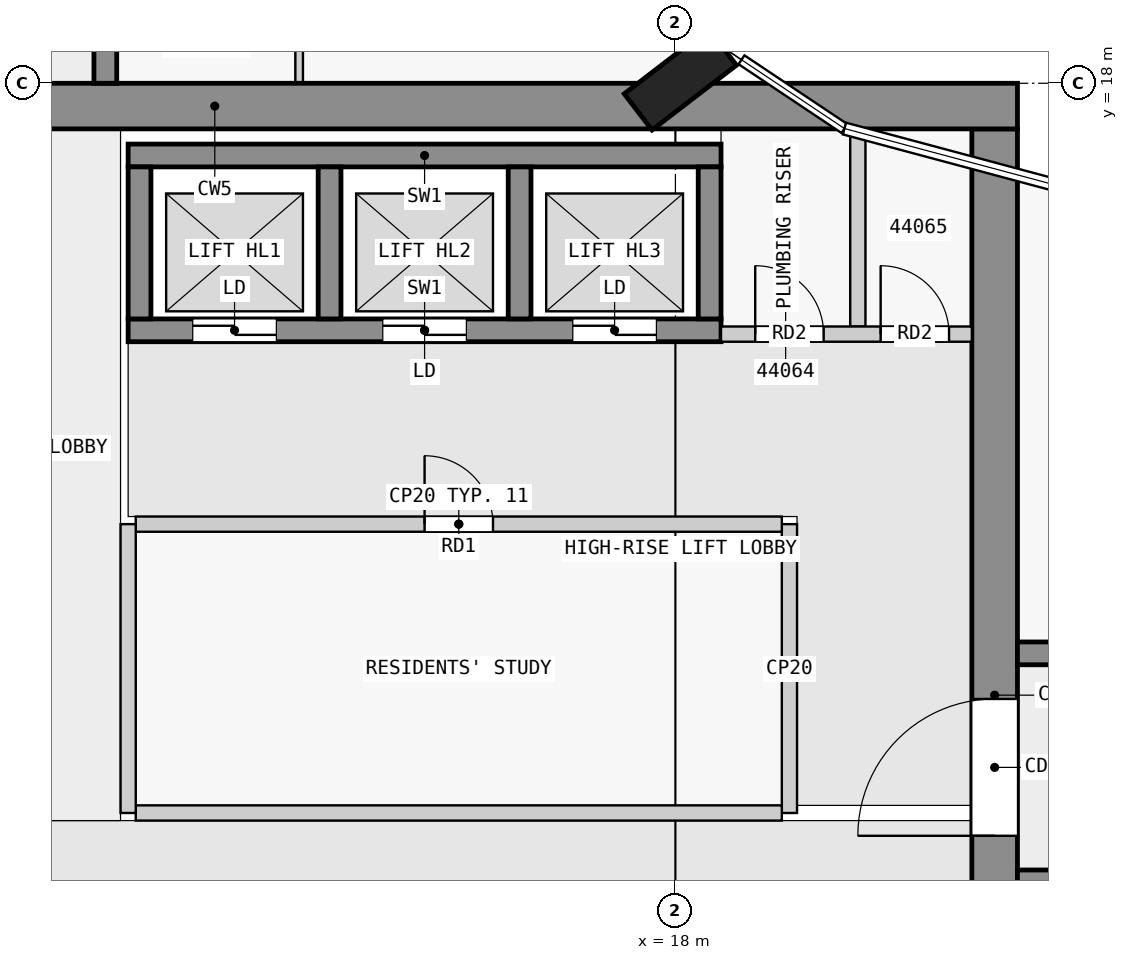
"""IFC4 building model, lengths in metres.
Left out: names, types, materials, properties, quantities, classifications, styles, units other than length and angle.
Written with IfcOpenShell. Run it as: python <this file> out.ifc"""

import sys

from ifc_helpers import new_model, si_unit, direction, frame, frame_2d, origin, origin_2d, place, context, subcontext, project, spatial, rectangle, extrude, element, fill, save


model = new_model("IFC4")
c1 = context("Model", 3, precision=1e-05, world=origin(), true_north=direction((0.0, 1.0)))
c2 = subcontext(c1, "Body", "Model", "MODEL_VIEW")
j1 = project(units=[si_unit("LENGTHUNIT", "METRE"), si_unit("PLANEANGLEUNIT", "RADIAN")], contexts=[c1])
p1 = place(None, origin())
s1 = spatial("IfcSite", under=j1, at=p1, CompositionType="ELEMENT")
p2 = place(p1, origin())
s2 = spatial("IfcBuilding", under=s1, at=p2, CompositionType="ELEMENT")
p3 = place(p2, frame((0.0, 0.0, 170.9)))
s3 = spatial("IfcBuildingStorey", under=s2, at=p3, CompositionType="ELEMENT", Elevation=170.9)
p4 = place(p3, frame((18.065, 18.05, 0.0), z_axis=(0.0, 0.0, 1.0), x_axis=(-0.608810846443, 0.793315418515, 0.0)))
e1 = element("IfcColumn", 1, at=p4, inside=s3, PredefinedType="COLUMN", context=c2, shape_type="SweptSolid", body=[
    extrude(rectangle(XDim=0.6, YDim=1.4, at=origin_2d()), origin(), (0.0, 0.0, 1.0), 3.5),
])
p5 = place(p3, frame((1.38, 17.7, 0.0), z_axis=(0.0, 0.0, 1.0), x_axis=(1.0, 0.0, 0.0)))
e2 = element("IfcWall", 2, at=p5, inside=s3, PredefinedType="SHEAR", context=c2, shape_type="SweptSolid", body=[
    extrude(rectangle(XDim=21.12, YDim=0.6, at=frame_2d((10.56, 0.0))), origin(), (0.0, 0.0, 1.0), 3.25),
])
p6 = place(p5, frame((6.4, 0.0, 0.0)))
e3 = element("IfcOpeningElement", 3, at=p6, cuts=e2, PredefinedType="OPENING", context=c2, shape_type="SweptSolid", body=[
    extrude(rectangle(XDim=1.8, YDim=2.1, at=frame_2d((0.9, 1.05))), frame((0.0, 0.31, 0.0), z_axis=(0.0, -1.0, 0.0), x_axis=(1.0, 0.0, 0.0)), (0.0, 0.0, 1.0), 0.62),
])
p7 = place(p3, frame((22.2, 2.5, 0.0), z_axis=(0.0, 0.0, 1.0), x_axis=(0.0, 1.0, 0.0)))
e4 = element("IfcWall", 4, at=p7, inside=s3, PredefinedType="SHEAR", context=c2, shape_type="SweptSolid", body=[
    extrude(rectangle(XDim=14.9, YDim=0.6, at=frame_2d((7.45, 0.0))), origin(), (0.0, 0.0, 1.0), 3.25),
])
p8 = place(p7, frame((5.6, 0.0, 0.0)))
e5 = element("IfcOpeningElement", 5, at=p8, cuts=e4, PredefinedType="OPENING", context=c2, shape_type="SweptSolid", body=[
    extrude(rectangle(XDim=1.8, YDim=2.1, at=frame_2d((0.9, 1.05))), frame((0.0, 0.31, 0.0), z_axis=(0.0, -1.0, 0.0), x_axis=(1.0, 0.0, 0.0)), (0.0, 0.0, 1.0), 0.62),
])
p9 = place(p3, frame((10.8, 17.05, 0.0), z_axis=(0.0, 0.0, 1.0), x_axis=(1.0, 0.0, 0.0)))
e6 = element("IfcWall", 6, at=p9, inside=s3, PredefinedType="SHEAR", context=c2, shape_type="SweptSolid", body=[
    extrude(rectangle(XDim=7.8, YDim=0.3, at=frame_2d((3.9, 0.0))), origin(), (0.0, 0.0, 1.0), 3.25),
])
p10 = place(p3, frame((10.8, 14.75, 0.0), z_axis=(0.0, 0.0, 1.0), x_axis=(1.0, 0.0, 0.0)))
e7 = element("IfcWall", 7, at=p10, inside=s3, PredefinedType="SHEAR", context=c2, shape_type="SweptSolid", body=[
    extrude(rectangle(XDim=7.8, YDim=0.3, at=frame_2d((3.9, 0.0))), origin(), (0.0, 0.0, 1.0), 3.25),
])
p11 = place(p10, frame((0.85, 0.0, 0.0)))
e8 = element("IfcOpeningElement", 8, at=p11, cuts=e7, PredefinedType="OPENING", context=c2, shape_type="SweptSolid", body=[
    extrude(rectangle(XDim=1.1, YDim=2.1, at=frame_2d((0.55, 1.05))), frame((0.0, 0.16, 0.0), z_axis=(0.0, -1.0, 0.0), x_axis=(1.0, 0.0, 0.0)), (0.0, 0.0, 1.0), 0.32),
])
p12 = place(p10, frame((3.35, 0.0, 0.0)))
e9 = element("IfcOpeningElement", 9, at=p12, cuts=e7, PredefinedType="OPENING", context=c2, shape_type="SweptSolid", body=[
    extrude(rectangle(XDim=1.1, YDim=2.1, at=frame_2d((0.55, 1.05))), frame((0.0, 0.16, 0.0), z_axis=(0.0, -1.0, 0.0), x_axis=(1.0, 0.0, 0.0)), (0.0, 0.0, 1.0), 0.32),
])
p13 = place(p10, frame((5.85, 0.0, 0.0)))
e10 = element("IfcOpeningElement", 10, at=p13, cuts=e7, PredefinedType="OPENING", context=c2, shape_type="SweptSolid", body=[
    extrude(rectangle(XDim=1.1, YDim=2.1, at=frame_2d((0.55, 1.05))), frame((0.0, 0.16, 0.0), z_axis=(0.0, -1.0, 0.0), x_axis=(1.0, 0.0, 0.0)), (0.0, 0.0, 1.0), 0.32),
])
for number, where, z_axis, x_axis in (
    (11, (10.95, 14.9, 0.0), (0.0, 0.0, 1.0), (0.0, 1.0, 0.0)),
    (12, (13.45, 14.9, 0.0), (0.0, 0.0, 1.0), (0.0, 1.0, 0.0)),
    (13, (15.95, 14.9, 0.0), (0.0, 0.0, 1.0), (0.0, 1.0, 0.0)),
    (14, (18.45, 14.9, 0.0), (0.0, 0.0, 1.0), (0.0, 1.0, 0.0)),
):
    element("IfcWall", number, at=place(p3, frame(where, z_axis=z_axis, x_axis=x_axis)), inside=s3, PredefinedType="SHEAR", context=c2, shape_type="SweptSolid", body=[
        extrude(rectangle(XDim=2.0, YDim=0.3, at=frame_2d((1.0, 0.0))), origin(), (0.0, 0.0, 1.0), 3.25),
    ])
p14 = place(p3, frame((22.5, 7.5, 0.0), z_axis=(0.0, 0.0, 1.0), x_axis=(1.0, 0.0, 0.0)))
e15 = element("IfcWall", 15, at=p14, inside=s3, PredefinedType="SHEAR", context=c2, shape_type="SweptSolid", body=[
    extrude(rectangle(XDim=22.5, YDim=0.3, at=frame_2d((11.25, 0.0))), origin(), (0.0, 0.0, 1.0), 3.25),
])
p15 = place(p14, frame((4.05, 0.0, 0.0)))
e16 = element("IfcOpeningElement", 16, at=p15, cuts=e15, PredefinedType="OPENING", context=c2, shape_type="SweptSolid", body=[
    extrude(rectangle(XDim=1.0, YDim=2.1, at=frame_2d((0.5, 1.05))), frame((0.0, 0.16, 0.0), z_axis=(0.0, -1.0, 0.0), x_axis=(1.0, 0.0, 0.0)), (0.0, 0.0, 1.0), 0.32),
])
p16 = place(p14, frame((10.75, 0.0, 0.0)))
e17 = element("IfcOpeningElement", 17, at=p16, cuts=e15, PredefinedType="OPENING", context=c2, shape_type="SweptSolid", body=[
    extrude(rectangle(XDim=1.0, YDim=2.1, at=frame_2d((0.5, 1.05))), frame((0.0, 0.16, 0.0), z_axis=(0.0, -1.0, 0.0), x_axis=(1.0, 0.0, 0.0)), (0.0, 0.0, 1.0), 0.32),
])
p17 = place(p14, frame((15.35, 0.0, 0.0)))
e18 = element("IfcOpeningElement", 18, at=p17, cuts=e15, PredefinedType="OPENING", context=c2, shape_type="SweptSolid", body=[
    extrude(rectangle(XDim=0.9, YDim=2.1, at=frame_2d((0.45, 1.05))), frame((0.0, 0.16, 0.0), z_axis=(0.0, -1.0, 0.0), x_axis=(1.0, 0.0, 0.0)), (0.0, 0.0, 1.0), 0.32),
])
p18 = place(p14, frame((18.75, 0.0, 0.0)))
e19 = element("IfcOpeningElement", 19, at=p18, cuts=e15, PredefinedType="OPENING", context=c2, shape_type="SweptSolid", body=[
    extrude(rectangle(XDim=0.9, YDim=2.1, at=frame_2d((0.45, 1.05))), frame((0.0, 0.16, 0.0), z_axis=(0.0, -1.0, 0.0), x_axis=(1.0, 0.0, 0.0)), (0.0, 0.0, 1.0), 0.32),
])
p19 = place(p14, frame((20.95, 0.0, 0.0)))
e20 = element("IfcOpeningElement", 20, at=p19, cuts=e15, PredefinedType="OPENING", context=c2, shape_type="SweptSolid", body=[
    extrude(rectangle(XDim=1.0, YDim=2.1, at=frame_2d((0.5, 1.05))), frame((0.0, 0.16, 0.0), z_axis=(0.0, -1.0, 0.0), x_axis=(1.0, 0.0, 0.0)), (0.0, 0.0, 1.0), 0.32),
])
p20 = place(p3, frame((22.5, 10.5, 0.0), z_axis=(0.0, 0.0, 1.0), x_axis=(1.0, 0.0, 0.0)))
e21 = element("IfcWall", 21, at=p20, inside=s3, PredefinedType="SHEAR", context=c2, shape_type="SweptSolid", body=[
    extrude(rectangle(XDim=22.5, YDim=0.3, at=frame_2d((11.25, 0.0))), origin(), (0.0, 0.0, 1.0), 3.25),
])
p21 = place(p20, frame((1.85, 0.0, 0.0)))
e22 = element("IfcOpeningElement", 22, at=p21, cuts=e21, PredefinedType="OPENING", context=c2, shape_type="SweptSolid", body=[
    extrude(rectangle(XDim=0.9, YDim=2.1, at=frame_2d((0.45, 1.05))), frame((0.0, 0.16, 0.0), z_axis=(0.0, -1.0, 0.0), x_axis=(1.0, 0.0, 0.0)), (0.0, 0.0, 1.0), 0.32),
])
p22 = place(p20, frame((6.25, 0.0, 0.0)))
e23 = element("IfcOpeningElement", 23, at=p22, cuts=e21, PredefinedType="OPENING", context=c2, shape_type="SweptSolid", body=[
    extrude(rectangle(XDim=1.0, YDim=2.1, at=frame_2d((0.5, 1.05))), frame((0.0, 0.16, 0.0), z_axis=(0.0, -1.0, 0.0), x_axis=(1.0, 0.0, 0.0)), (0.0, 0.0, 1.0), 0.32),
])
p23 = place(p20, frame((10.35, 0.0, 0.0)))
e24 = element("IfcOpeningElement", 24, at=p23, cuts=e21, PredefinedType="OPENING", context=c2, shape_type="SweptSolid", body=[
    extrude(rectangle(XDim=1.8, YDim=2.1, at=frame_2d((0.9, 1.05))), frame((0.0, 0.16, 0.0), z_axis=(0.0, -1.0, 0.0), x_axis=(1.0, 0.0, 0.0)), (0.0, 0.0, 1.0), 0.32),
])
p24 = place(p20, frame((16.85, 0.0, 0.0)))
e25 = element("IfcOpeningElement", 25, at=p24, cuts=e21, PredefinedType="OPENING", context=c2, shape_type="SweptSolid", body=[
    extrude(rectangle(XDim=1.0, YDim=2.1, at=frame_2d((0.5, 1.05))), frame((0.0, 0.16, 0.0), z_axis=(0.0, -1.0, 0.0), x_axis=(1.0, 0.0, 0.0)), (0.0, 0.0, 1.0), 0.32),
])
p25 = place(p3, frame((10.5, 18.0, 0.0), z_axis=(0.0, 0.0, 1.0), x_axis=(0.0, 1.0, 0.0)))
e26 = element("IfcWall", 26, at=p25, inside=s3, PredefinedType="SHEAR", context=c2, shape_type="SweptSolid", body=[
    extrude(rectangle(XDim=27.0, YDim=0.3, at=frame_2d((13.5, 0.0))), origin(), (0.0, 0.0, 1.0), 3.25),
])
p26 = place(p25, frame((1.75, 0.0, 0.0)))
e27 = element("IfcOpeningElement", 27, at=p26, cuts=e26, PredefinedType="OPENING", context=c2, shape_type="SweptSolid", body=[
    extrude(rectangle(XDim=1.0, YDim=2.1, at=frame_2d((0.5, 1.05))), frame((0.0, 0.16, 0.0), z_axis=(0.0, -1.0, 0.0), x_axis=(1.0, 0.0, 0.0)), (0.0, 0.0, 1.0), 0.32),
])
p27 = place(p25, frame((6.25, 0.0, 0.0)))
e28 = element("IfcOpeningElement", 28, at=p27, cuts=e26, PredefinedType="OPENING", context=c2, shape_type="SweptSolid", body=[
    extrude(rectangle(XDim=1.0, YDim=2.1, at=frame_2d((0.5, 1.05))), frame((0.0, 0.16, 0.0), z_axis=(0.0, -1.0, 0.0), x_axis=(1.0, 0.0, 0.0)), (0.0, 0.0, 1.0), 0.32),
])
p28 = place(p25, frame((10.75, 0.0, 0.0)))
e29 = element("IfcOpeningElement", 29, at=p28, cuts=e26, PredefinedType="OPENING", context=c2, shape_type="SweptSolid", body=[
    extrude(rectangle(XDim=1.0, YDim=2.1, at=frame_2d((0.5, 1.05))), frame((0.0, 0.16, 0.0), z_axis=(0.0, -1.0, 0.0), x_axis=(1.0, 0.0, 0.0)), (0.0, 0.0, 1.0), 0.32),
])
p29 = place(p25, frame((15.25, 0.0, 0.0)))
e30 = element("IfcOpeningElement", 30, at=p29, cuts=e26, PredefinedType="OPENING", context=c2, shape_type="SweptSolid", body=[
    extrude(rectangle(XDim=1.0, YDim=2.1, at=frame_2d((0.5, 1.05))), frame((0.0, 0.16, 0.0), z_axis=(0.0, -1.0, 0.0), x_axis=(1.0, 0.0, 0.0)), (0.0, 0.0, 1.0), 0.32),
])
p30 = place(p25, frame((19.75, 0.0, 0.0)))
e31 = element("IfcOpeningElement", 31, at=p30, cuts=e26, PredefinedType="OPENING", context=c2, shape_type="SweptSolid", body=[
    extrude(rectangle(XDim=1.0, YDim=2.1, at=frame_2d((0.5, 1.05))), frame((0.0, 0.16, 0.0), z_axis=(0.0, -1.0, 0.0), x_axis=(1.0, 0.0, 0.0)), (0.0, 0.0, 1.0), 0.32),
])
p31 = place(p25, frame((23.25, 0.0, 0.0)))
e32 = element("IfcOpeningElement", 32, at=p31, cuts=e26, PredefinedType="OPENING", context=c2, shape_type="SweptSolid", body=[
    extrude(rectangle(XDim=0.9, YDim=2.1, at=frame_2d((0.45, 1.05))), frame((0.0, 0.16, 0.0), z_axis=(0.0, -1.0, 0.0), x_axis=(1.0, 0.0, 0.0)), (0.0, 0.0, 1.0), 0.32),
])
p32 = place(p25, frame((25.45, 0.0, 0.0)))
e33 = element("IfcOpeningElement", 33, at=p32, cuts=e26, PredefinedType="OPENING", context=c2, shape_type="SweptSolid", body=[
    extrude(rectangle(XDim=1.0, YDim=2.1, at=frame_2d((0.5, 1.05))), frame((0.0, 0.16, 0.0), z_axis=(0.0, -1.0, 0.0), x_axis=(1.0, 0.0, 0.0)), (0.0, 0.0, 1.0), 0.32),
])
p33 = place(p3, frame((10.8, 8.4, 0.0), z_axis=(0.0, 0.0, 1.0), x_axis=(0.0, 1.0, 0.0)))
e34 = element("IfcWall", 34, at=p33, inside=s3, PredefinedType="PARTITIONING", context=c2, shape_type="SweptSolid", body=[
    extrude(rectangle(XDim=3.8, YDim=0.2, at=frame_2d((1.9, 0.0))), origin(), (0.0, 0.0, 1.0), 3.25),
])
p34 = place(p3, frame((10.9, 8.4, 0.0), z_axis=(0.0, 0.0, 1.0), x_axis=(1.0, 0.0, 0.0)))
e35 = element("IfcWall", 35, at=p34, inside=s3, PredefinedType="PARTITIONING", context=c2, shape_type="SweptSolid", body=[
    extrude(rectangle(XDim=8.5, YDim=0.2, at=frame_2d((4.25, 0.0))), origin(), (0.0, 0.0, 1.0), 3.25),
])
p35 = place(p3, frame((19.5, 8.4, 0.0), z_axis=(0.0, 0.0, 1.0), x_axis=(0.0, 1.0, 0.0)))
e36 = element("IfcWall", 36, at=p35, inside=s3, PredefinedType="PARTITIONING", context=c2, shape_type="SweptSolid", body=[
    extrude(rectangle(XDim=3.8, YDim=0.2, at=frame_2d((1.9, 0.0))), origin(), (0.0, 0.0, 1.0), 3.25),
])
p36 = place(p3, frame((10.9, 12.2, 0.0), z_axis=(0.0, 0.0, 1.0), x_axis=(1.0, 0.0, 0.0)))
e37 = element("IfcWall", 37, at=p36, inside=s3, PredefinedType="PARTITIONING", context=c2, shape_type="SweptSolid", body=[
    extrude(rectangle(XDim=8.5, YDim=0.2, at=frame_2d((4.25, 0.0))), origin(), (0.0, 0.0, 1.0), 3.25),
])
p37 = place(p36, frame((3.8, 0.0, 0.0)))
e38 = element("IfcOpeningElement", 38, at=p37, cuts=e37, PredefinedType="OPENING", context=c2, shape_type="SweptSolid", body=[
    extrude(rectangle(XDim=0.9, YDim=2.1, at=frame_2d((0.45, 1.05))), frame((0.0, 0.11, 0.0), z_axis=(0.0, -1.0, 0.0), x_axis=(1.0, 0.0, 0.0)), (0.0, 0.0, 1.0), 0.22),
])
p38 = place(p3, frame((18.6, 14.7, 0.0), z_axis=(0.0, 0.0, 1.0), x_axis=(1.0, 0.0, 0.0)))
e39 = element("IfcWall", 39, at=p38, inside=s3, PredefinedType="PARTITIONING", context=c2, shape_type="SweptSolid", body=[
    extrude(rectangle(XDim=3.3, YDim=0.2, at=frame_2d((1.65, 0.0))), origin(), (0.0, 0.0, 1.0), 3.25),
])
p39 = place(p38, frame((0.45, 0.0, 0.0)))
e40 = element("IfcOpeningElement", 40, at=p39, cuts=e39, PredefinedType="OPENING", context=c2, shape_type="SweptSolid", body=[
    extrude(rectangle(XDim=0.9, YDim=2.1, at=frame_2d((0.45, 1.05))), frame((0.0, 0.11, 0.0), z_axis=(0.0, -1.0, 0.0), x_axis=(1.0, 0.0, 0.0)), (0.0, 0.0, 1.0), 0.22),
])
p40 = place(p38, frame((2.1, 0.0, 0.0)))
e41 = element("IfcOpeningElement", 41, at=p40, cuts=e39, PredefinedType="OPENING", context=c2, shape_type="SweptSolid", body=[
    extrude(rectangle(XDim=0.9, YDim=2.1, at=frame_2d((0.45, 1.05))), frame((0.0, 0.11, 0.0), z_axis=(0.0, -1.0, 0.0), x_axis=(1.0, 0.0, 0.0)), (0.0, 0.0, 1.0), 0.22),
])
p41 = place(p3, frame((20.4, 14.8, 0.0), z_axis=(0.0, 0.0, 1.0), x_axis=(0.0, 1.0, 0.0)))
e42 = element("IfcWall", 42, at=p41, inside=s3, PredefinedType="PARTITIONING", context=c2, shape_type="SweptSolid", body=[
    extrude(rectangle(XDim=2.6, YDim=0.2, at=frame_2d((1.3, 0.0))), origin(), (0.0, 0.0, 1.0), 3.25),
])
p42 = place(p3, frame((13.05, 18.0, 0.0), z_axis=(0.0, 0.0, 1.0), x_axis=(0.0, 1.0, 0.0)))
e43 = element("IfcWall", 43, at=p42, inside=s3, PredefinedType="PARTITIONING", context=c2, shape_type="SweptSolid", body=[
    extrude(rectangle(XDim=1.45, YDim=0.1, at=frame_2d((0.725, 0.0))), origin(), (0.0, 0.0, 1.0), 3.25),
])
p43 = place(p37, origin())
e44 = element("IfcDoor", 44, at=p43, inside=s3, OperationType="SINGLE_SWING_LEFT", PredefinedType="DOOR", context=c2, shape_type="SweptSolid", body=[
    extrude(rectangle(XDim=0.9, YDim=2.1, at=frame_2d((0.45, 1.05))), frame((0.0, 0.025, 0.0), z_axis=(0.0, -1.0, 0.0), x_axis=(1.0, 0.0, 0.0)), (0.0, 0.0, 1.0), 0.05),
])
fill(e38, e44)
p44 = place(p11, origin())
e45 = element("IfcDoor", 45, at=p44, inside=s3, OperationType="DOUBLE_DOOR_SLIDING", PredefinedType="DOOR", context=c2, shape_type="SweptSolid", body=[
    extrude(rectangle(XDim=1.1, YDim=2.1, at=frame_2d((0.55, 1.05))), frame((0.0, 0.025, 0.0), z_axis=(0.0, -1.0, 0.0), x_axis=(1.0, 0.0, 0.0)), (0.0, 0.0, 1.0), 0.05),
])
fill(e8, e45)
p45 = place(p12, origin())
e46 = element("IfcDoor", 46, at=p45, inside=s3, OperationType="DOUBLE_DOOR_SLIDING", PredefinedType="DOOR", context=c2, shape_type="SweptSolid", body=[
    extrude(rectangle(XDim=1.1, YDim=2.1, at=frame_2d((0.55, 1.05))), frame((0.0, 0.025, 0.0), z_axis=(0.0, -1.0, 0.0), x_axis=(1.0, 0.0, 0.0)), (0.0, 0.0, 1.0), 0.05),
])
fill(e9, e46)
p46 = place(p13, origin())
e47 = element("IfcDoor", 47, at=p46, inside=s3, OperationType="DOUBLE_DOOR_SLIDING", PredefinedType="DOOR", context=c2, shape_type="SweptSolid", body=[
    extrude(rectangle(XDim=1.1, YDim=2.1, at=frame_2d((0.55, 1.05))), frame((0.0, 0.025, 0.0), z_axis=(0.0, -1.0, 0.0), x_axis=(1.0, 0.0, 0.0)), (0.0, 0.0, 1.0), 0.05),
])
fill(e10, e47)
p47 = place(p8, origin())
e48 = element("IfcDoor", 48, at=p47, inside=s3, OperationType="DOUBLE_DOOR_SINGLE_SWING", PredefinedType="DOOR", context=c2, shape_type="SweptSolid", body=[
    extrude(rectangle(XDim=1.8, YDim=2.1, at=frame_2d((0.9, 1.05))), frame((0.0, 0.025, 0.0), z_axis=(0.0, -1.0, 0.0), x_axis=(1.0, 0.0, 0.0)), (0.0, 0.0, 1.0), 0.05),
])
fill(e5, e48)
p48 = place(p39, origin())
e49 = element("IfcDoor", 49, at=p48, inside=s3, OperationType="SINGLE_SWING_LEFT", PredefinedType="DOOR", context=c2, shape_type="SweptSolid", body=[
    extrude(rectangle(XDim=0.9, YDim=2.1, at=frame_2d((0.45, 1.05))), frame((0.0, 0.025, 0.0), z_axis=(0.0, -1.0, 0.0), x_axis=(1.0, 0.0, 0.0)), (0.0, 0.0, 1.0), 0.05),
])
fill(e40, e49)
p49 = place(p40, origin())
e50 = element("IfcDoor", 50, at=p49, inside=s3, OperationType="SINGLE_SWING_LEFT", PredefinedType="DOOR", context=c2, shape_type="SweptSolid", body=[
    extrude(rectangle(XDim=0.9, YDim=2.1, at=frame_2d((0.45, 1.05))), frame((0.0, 0.025, 0.0), z_axis=(0.0, -1.0, 0.0), x_axis=(1.0, 0.0, 0.0)), (0.0, 0.0, 1.0), 0.05),
])
fill(e41, e50)
save(model, sys.argv[1])
